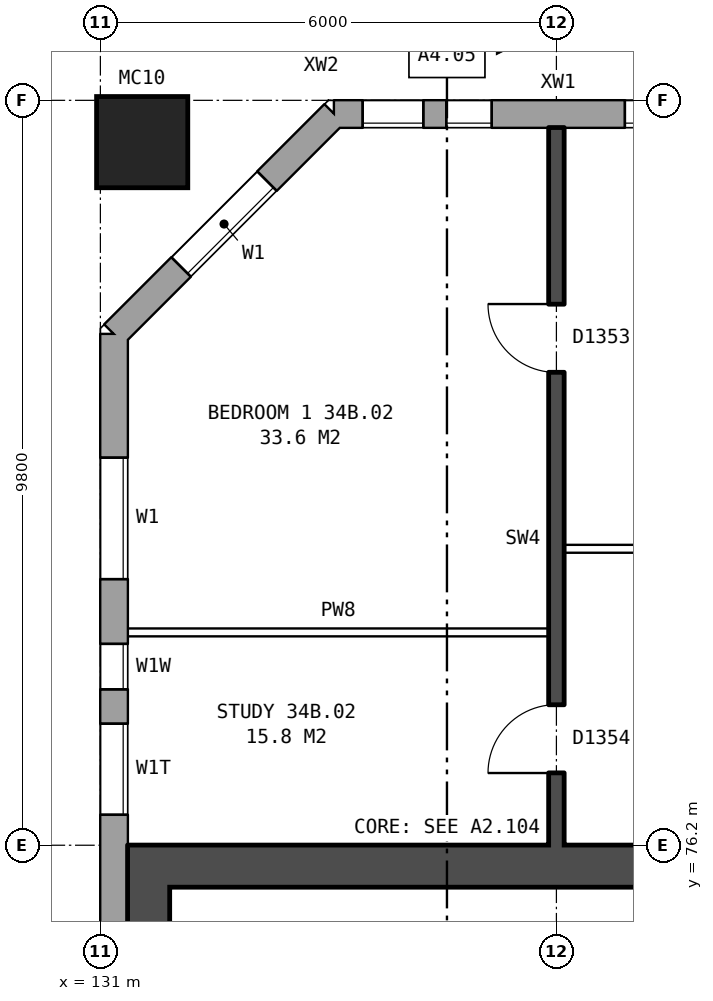
"""IFC4 building model, lengths in metres.
Left out: names, types, materials, properties, quantities, classifications, styles, units other than length and angle.
Written with IfcOpenShell. Run it as: python <this file> out.ifc"""

import sys

from ifc_helpers import new_model, si_unit, direction, frame, frame_2d, origin, origin_2d, place, context, subcontext, project, spatial, rectangle, hollow_rectangle, extrude, element, fill, save


model = new_model("IFC4")
c1 = context("Model", 3, precision=1e-05, world=origin(), true_north=direction((0.0, 1.0)))
c2 = subcontext(c1, "Body", "Model", "MODEL_VIEW")
j1 = project(units=[si_unit("LENGTHUNIT", "METRE"), si_unit("PLANEANGLEUNIT", "RADIAN")], contexts=[c1])
p1 = place(None, origin())
s1 = spatial("IfcSite", under=j1, at=p1, CompositionType="ELEMENT")
p2 = place(p1, origin())
s2 = spatial("IfcBuilding", under=s1, at=p2, CompositionType="ELEMENT")
p3 = place(p2, frame((0.0, 0.0, 123.7)))
s3 = spatial("IfcBuildingStorey", under=s2, at=p3, CompositionType="ELEMENT", Elevation=123.7)
p4 = place(p3, frame((131.55, 85.45, 0.0), z_axis=(0.0, 0.0, 1.0), x_axis=(1.0, 0.0, 0.0)))
e1 = element("IfcColumn", 1, at=p4, inside=s3, PredefinedType="COLUMN", context=c2, shape_type="SweptSolid", body=[
    extrude(hollow_rectangle(XDim=1.2, YDim=1.2, WallThickness=0.065, at=origin_2d()), origin(), (0.0, 0.0, 1.0), 3.1),
])
p5 = place(p3, frame((169.675, 85.82, 0.0), z_axis=(0.0, 0.0, 1.0), x_axis=(-1.0, 0.0, 0.0)))
e2 = element("IfcWall", 2, at=p5, inside=s3, PredefinedType="STANDARD", context=c2, shape_type="SweptSolid", body=[
    extrude(rectangle(XDim=35.601, YDim=0.36, at=frame_2d((17.8, 0.0))), origin(), (0.0, 0.0, 1.0), 2.85),
])
p6 = place(p5, frame((0.3, 0.0, 0.8)))
e3 = element("IfcOpeningElement", 3, at=p6, cuts=e2, PredefinedType="OPENING", context=c2, shape_type="SweptSolid", body=[
    extrude(rectangle(XDim=0.8, YDim=1.8, at=frame_2d((0.4, 0.9))), frame((0.0, 0.19, 0.0), z_axis=(0.0, -1.0, 0.0), x_axis=(1.0, 0.0, 0.0)), (0.0, 0.0, 1.0), 0.38),
])
p7 = place(p5, frame((3.125, 0.0, 0.8)))
e4 = element("IfcOpeningElement", 4, at=p7, cuts=e2, PredefinedType="OPENING", context=c2, shape_type="SweptSolid", body=[
    extrude(rectangle(XDim=0.8, YDim=0.9, at=frame_2d((0.4, 0.45))), frame((0.0, 0.19, 0.0), z_axis=(0.0, -1.0, 0.0), x_axis=(1.0, 0.0, 0.0)), (0.0, 0.0, 1.0), 0.38),
])
p8 = place(p5, frame((6.375, 0.0, 0.8)))
e5 = element("IfcOpeningElement", 5, at=p8, cuts=e2, PredefinedType="OPENING", context=c2, shape_type="SweptSolid", body=[
    extrude(rectangle(XDim=1.6, YDim=1.8, at=frame_2d((0.8, 0.9))), frame((0.0, 0.19, 0.0), z_axis=(0.0, -1.0, 0.0), x_axis=(1.0, 0.0, 0.0)), (0.0, 0.0, 1.0), 0.38),
])
p9 = place(p5, frame((9.375, 0.0, 0.8)))
e6 = element("IfcOpeningElement", 6, at=p9, cuts=e2, PredefinedType="OPENING", context=c2, shape_type="SweptSolid", body=[
    extrude(rectangle(XDim=1.6, YDim=1.8, at=frame_2d((0.8, 0.9))), frame((0.0, 0.19, 0.0), z_axis=(0.0, -1.0, 0.0), x_axis=(1.0, 0.0, 0.0)), (0.0, 0.0, 1.0), 0.38),
])
p10 = place(p5, frame((12.375, 0.0, 0.8)))
e7 = element("IfcOpeningElement", 7, at=p10, cuts=e2, PredefinedType="OPENING", context=c2, shape_type="SweptSolid", body=[
    extrude(rectangle(XDim=1.6, YDim=1.8, at=frame_2d((0.8, 0.9))), frame((0.0, 0.19, 0.0), z_axis=(0.0, -1.0, 0.0), x_axis=(1.0, 0.0, 0.0)), (0.0, 0.0, 1.0), 0.38),
])
p11 = place(p5, frame((15.375, 0.0, 0.8)))
e8 = element("IfcOpeningElement", 8, at=p11, cuts=e2, PredefinedType="OPENING", context=c2, shape_type="SweptSolid", body=[
    extrude(rectangle(XDim=1.6, YDim=1.8, at=frame_2d((0.8, 0.9))), frame((0.0, 0.19, 0.0), z_axis=(0.0, -1.0, 0.0), x_axis=(1.0, 0.0, 0.0)), (0.0, 0.0, 1.0), 0.38),
])
p12 = place(p5, frame((18.375, 0.0, 0.8)))
e9 = element("IfcOpeningElement", 9, at=p12, cuts=e2, PredefinedType="OPENING", context=c2, shape_type="SweptSolid", body=[
    extrude(rectangle(XDim=1.6, YDim=1.8, at=frame_2d((0.8, 0.9))), frame((0.0, 0.19, 0.0), z_axis=(0.0, -1.0, 0.0), x_axis=(1.0, 0.0, 0.0)), (0.0, 0.0, 1.0), 0.38),
])
p13 = place(p5, frame((21.375, 0.0, 0.8)))
e10 = element("IfcOpeningElement", 10, at=p13, cuts=e2, PredefinedType="OPENING", context=c2, shape_type="SweptSolid", body=[
    extrude(rectangle(XDim=1.6, YDim=1.8, at=frame_2d((0.8, 0.9))), frame((0.0, 0.19, 0.0), z_axis=(0.0, -1.0, 0.0), x_axis=(1.0, 0.0, 0.0)), (0.0, 0.0, 1.0), 0.38),
])
p14 = place(p5, frame((24.375, 0.0, 0.8)))
e11 = element("IfcOpeningElement", 11, at=p14, cuts=e2, PredefinedType="OPENING", context=c2, shape_type="SweptSolid", body=[
    extrude(rectangle(XDim=1.6, YDim=1.8, at=frame_2d((0.8, 0.9))), frame((0.0, 0.19, 0.0), z_axis=(0.0, -1.0, 0.0), x_axis=(1.0, 0.0, 0.0)), (0.0, 0.0, 1.0), 0.38),
])
p15 = place(p5, frame((27.375, 0.0, 0.8)))
e12 = element("IfcOpeningElement", 12, at=p15, cuts=e2, PredefinedType="OPENING", context=c2, shape_type="SweptSolid", body=[
    extrude(rectangle(XDim=1.6, YDim=1.8, at=frame_2d((0.8, 0.9))), frame((0.0, 0.19, 0.0), z_axis=(0.0, -1.0, 0.0), x_axis=(1.0, 0.0, 0.0)), (0.0, 0.0, 1.0), 0.38),
])
p16 = place(p5, frame((29.275, 0.0, 0.8)))
e13 = element("IfcOpeningElement", 13, at=p16, cuts=e2, PredefinedType="OPENING", context=c2, shape_type="SweptSolid", body=[
    extrude(rectangle(XDim=1.4, YDim=1.8, at=frame_2d((0.7, 0.9))), frame((0.0, 0.19, 0.0), z_axis=(0.0, -1.0, 0.0), x_axis=(1.0, 0.0, 0.0)), (0.0, 0.0, 1.0), 0.38),
])
p17 = place(p5, frame((33.525, 0.0, 1.7)))
e14 = element("IfcOpeningElement", 14, at=p17, cuts=e2, PredefinedType="OPENING", context=c2, shape_type="SweptSolid", body=[
    extrude(rectangle(XDim=0.6, YDim=0.9, at=frame_2d((0.3, 0.45))), frame((0.0, 0.19, 0.0), z_axis=(0.0, -1.0, 0.0), x_axis=(1.0, 0.0, 0.0)), (0.0, 0.0, 1.0), 0.38),
])
p18 = place(p5, frame((1.4, 0.0, 1.6)))
e15 = element("IfcOpeningElement", 15, at=p18, cuts=e2, PredefinedType="OPENING", context=c2, shape_type="SweptSolid", body=[
    extrude(rectangle(XDim=0.6, YDim=0.9, at=frame_2d((0.3, 0.45))), frame((0.0, 0.19, 0.0), z_axis=(0.0, -1.0, 0.0), x_axis=(1.0, 0.0, 0.0)), (0.0, 0.0, 1.0), 0.38),
])
p19 = place(p5, frame((4.225, 0.0, 0.8)))
e16 = element("IfcOpeningElement", 16, at=p19, cuts=e2, PredefinedType="OPENING", context=c2, shape_type="SweptSolid", body=[
    extrude(rectangle(XDim=1.6, YDim=1.8, at=frame_2d((0.8, 0.9))), frame((0.0, 0.19, 0.0), z_axis=(0.0, -1.0, 0.0), x_axis=(1.0, 0.0, 0.0)), (0.0, 0.0, 1.0), 0.38),
])
p20 = place(p5, frame((30.975, 0.0, 0.8)))
e17 = element("IfcOpeningElement", 17, at=p20, cuts=e2, PredefinedType="OPENING", context=c2, shape_type="SweptSolid", body=[
    extrude(rectangle(XDim=0.8, YDim=1.5, at=frame_2d((0.4, 0.75))), frame((0.0, 0.19, 0.0), z_axis=(0.0, -1.0, 0.0), x_axis=(1.0, 0.0, 0.0)), (0.0, 0.0, 1.0), 0.38),
])
p21 = place(p5, frame((34.425, 0.0, 0.8)))
e18 = element("IfcOpeningElement", 18, at=p21, cuts=e2, PredefinedType="OPENING", context=c2, shape_type="SweptSolid", body=[
    extrude(rectangle(XDim=0.8, YDim=1.8, at=frame_2d((0.4, 0.9))), frame((0.0, 0.19, 0.0), z_axis=(0.0, -1.0, 0.0), x_axis=(1.0, 0.0, 0.0)), (0.0, 0.0, 1.0), 0.38),
])
p22 = place(p3, frame((134.075, 85.82, 0.0), z_axis=(0.0, 0.0, 1.0), x_axis=(-0.707106781187, -0.707106781187, 0.0)))
e19 = element("IfcWall", 19, at=p22, inside=s3, PredefinedType="STANDARD", context=c2, shape_type="SweptSolid", body=[
    extrude(rectangle(XDim=4.094, YDim=0.36, at=frame_2d((2.047, 0.0))), origin(), (0.0, 0.0, 1.0), 2.85),
])
p23 = place(p22, frame((1.247, 0.0, 0.8)))
e20 = element("IfcOpeningElement", 20, at=p23, cuts=e19, PredefinedType="OPENING", context=c2, shape_type="SweptSolid", body=[
    extrude(rectangle(XDim=1.6, YDim=1.8, at=frame_2d((0.8, 0.9))), frame((0.0, 0.19, 0.0), z_axis=(0.0, -1.0, 0.0), x_axis=(1.0, 0.0, 0.0)), (0.0, 0.0, 1.0), 0.38),
])
p24 = place(p3, frame((131.18, 82.925, 0.0), z_axis=(0.0, 0.0, 1.0), x_axis=(0.0, -1.0, 0.0)))
e21 = element("IfcWall", 21, at=p24, inside=s3, PredefinedType="STANDARD", context=c2, shape_type="SweptSolid", body=[
    extrude(rectangle(XDim=25.851, YDim=0.36, at=frame_2d((12.925, 0.0))), origin(), (0.0, 0.0, 1.0), 2.85),
])
p25 = place(p24, frame((1.625, 0.0, 0.8)))
e22 = element("IfcOpeningElement", 22, at=p25, cuts=e21, PredefinedType="OPENING", context=c2, shape_type="SweptSolid", body=[
    extrude(rectangle(XDim=1.6, YDim=1.8, at=frame_2d((0.8, 0.9))), frame((0.0, 0.19, 0.0), z_axis=(0.0, -1.0, 0.0), x_axis=(1.0, 0.0, 0.0)), (0.0, 0.0, 1.0), 0.38),
])
p26 = place(p24, frame((4.075, 0.0, 1.65)))
e23 = element("IfcOpeningElement", 23, at=p26, cuts=e21, PredefinedType="OPENING", context=c2, shape_type="SweptSolid", body=[
    extrude(rectangle(XDim=0.6, YDim=0.9, at=frame_2d((0.3, 0.45))), frame((0.0, 0.19, 0.0), z_axis=(0.0, -1.0, 0.0), x_axis=(1.0, 0.0, 0.0)), (0.0, 0.0, 1.0), 0.38),
])
p27 = place(p24, frame((19.5, 0.0, 0.35)))
e24 = element("IfcOpeningElement", 24, at=p27, cuts=e21, PredefinedType="OPENING", context=c2, shape_type="SweptSolid", body=[
    extrude(rectangle(XDim=1.2, YDim=0.9, at=frame_2d((0.6, 0.45))), frame((0.0, 0.19, 0.0), z_axis=(0.0, -1.0, 0.0), x_axis=(1.0, 0.0, 0.0)), (0.0, 0.0, 1.0), 0.38),
])
p28 = place(p24, frame((22.625, 0.0, 0.8)))
e25 = element("IfcOpeningElement", 25, at=p28, cuts=e21, PredefinedType="OPENING", context=c2, shape_type="SweptSolid", body=[
    extrude(rectangle(XDim=1.6, YDim=1.8, at=frame_2d((0.8, 0.9))), frame((0.0, 0.19, 0.0), z_axis=(0.0, -1.0, 0.0), x_axis=(1.0, 0.0, 0.0)), (0.0, 0.0, 1.0), 0.38),
])
p29 = place(p24, frame((5.125, 0.0, 0.35)))
e26 = element("IfcOpeningElement", 26, at=p29, cuts=e21, PredefinedType="OPENING", context=c2, shape_type="SweptSolid", body=[
    extrude(rectangle(XDim=1.2, YDim=0.9, at=frame_2d((0.6, 0.45))), frame((0.0, 0.19, 0.0), z_axis=(0.0, -1.0, 0.0), x_axis=(1.0, 0.0, 0.0)), (0.0, 0.0, 1.0), 0.38),
])
p30 = place(p24, frame((21.1, 0.0, 1.65)))
e27 = element("IfcOpeningElement", 27, at=p30, cuts=e21, PredefinedType="OPENING", context=c2, shape_type="SweptSolid", body=[
    extrude(rectangle(XDim=0.6, YDim=0.9, at=frame_2d((0.3, 0.45))), frame((0.0, 0.19, 0.0), z_axis=(0.0, -1.0, 0.0), x_axis=(1.0, 0.0, 0.0)), (0.0, 0.0, 1.0), 0.38),
])
p31 = place(p3, frame((131.635, 63.8, 0.0), z_axis=(0.0, 0.0, 1.0), x_axis=(0.0, 1.0, 0.0)))
e28 = element("IfcWall", 28, at=p31, inside=s3, PredefinedType="SHEAR", context=c2, shape_type="SweptSolid", body=[
    extrude(rectangle(XDim=12.4, YDim=0.55, at=frame_2d((6.2, 0.0))), origin(), (0.0, 0.0, 1.0), 2.85),
])
p32 = place(p3, frame((139.21, 75.925, 0.0), z_axis=(0.0, 0.0, 1.0), x_axis=(-1.0, 0.0, 0.0)))
e29 = element("IfcWall", 29, at=p32, inside=s3, PredefinedType="SHEAR", context=c2, shape_type="SweptSolid", body=[
    extrude(rectangle(XDim=7.3, YDim=0.55, at=frame_2d((3.65, 0.0))), origin(), (0.0, 0.0, 1.0), 2.85),
])
p33 = place(p3, frame((131.36, 79.0, 0.0), z_axis=(0.0, 0.0, 1.0), x_axis=(1.0, 0.0, 0.0)))
e30 = element("IfcWall", 30, at=p33, inside=s3, PredefinedType="PARTITIONING", context=c2, shape_type="SweptSolid", body=[
    extrude(rectangle(XDim=5.54, YDim=0.1, at=frame_2d((2.77, 0.0))), origin(), (0.0, 0.0, 1.0), 2.85),
])
p34 = place(p3, frame((137.1, 80.1, 0.0), z_axis=(0.0, 0.0, 1.0), x_axis=(1.0, 0.0, 0.0)))
e31 = element("IfcWall", 31, at=p34, inside=s3, PredefinedType="PARTITIONING", context=c2, shape_type="SweptSolid", body=[
    extrude(rectangle(XDim=5.8, YDim=0.1, at=frame_2d((2.9, 0.0))), origin(), (0.0, 0.0, 1.0), 2.85),
])
p35 = place(p34, frame((1.3, 0.0, 0.0)))
e32 = element("IfcOpeningElement", 32, at=p35, cuts=e31, PredefinedType="OPENING", context=c2, shape_type="SweptSolid", body=[
    extrude(rectangle(XDim=0.9, YDim=2.1, at=frame_2d((0.45, 1.05))), frame((0.0, 0.06, 0.0), z_axis=(0.0, -1.0, 0.0), x_axis=(1.0, 0.0, 0.0)), (0.0, 0.0, 1.0), 0.12),
])
p36 = place(p34, frame((4.2, 0.0, 0.0)))
e33 = element("IfcOpeningElement", 33, at=p36, cuts=e31, PredefinedType="OPENING", context=c2, shape_type="SweptSolid", body=[
    extrude(rectangle(XDim=0.9, YDim=2.1, at=frame_2d((0.45, 1.05))), frame((0.0, 0.06, 0.0), z_axis=(0.0, -1.0, 0.0), x_axis=(1.0, 0.0, 0.0)), (0.0, 0.0, 1.0), 0.12),
])
p37 = place(p3, frame((137.0, 76.2, 0.0), z_axis=(0.0, 0.0, 1.0), x_axis=(0.0, 1.0, 0.0)))
e34 = element("IfcWall", 34, at=p37, inside=s3, PredefinedType="SOLIDWALL", context=c2, shape_type="SweptSolid", body=[
    extrude(rectangle(XDim=9.44, YDim=0.2, at=frame_2d((4.72, 0.0))), origin(), (0.0, 0.0, 1.0), 2.85),
])
p38 = place(p37, frame((6.22, 0.0, 0.0)))
e35 = element("IfcOpeningElement", 35, at=p38, cuts=e34, PredefinedType="OPENING", context=c2, shape_type="SweptSolid", body=[
    extrude(rectangle(XDim=0.9, YDim=2.1, at=frame_2d((0.45, 1.05))), frame((0.0, 0.11, 0.0), z_axis=(0.0, -1.0, 0.0), x_axis=(1.0, 0.0, 0.0)), (0.0, 0.0, 1.0), 0.22),
])
p39 = place(p37, frame((0.95, 0.0, 0.0)))
e36 = element("IfcOpeningElement", 36, at=p39, cuts=e34, PredefinedType="OPENING", context=c2, shape_type="SweptSolid", body=[
    extrude(rectangle(XDim=0.9, YDim=2.1, at=frame_2d((0.45, 1.05))), frame((0.0, 0.11, 0.0), z_axis=(0.0, -1.0, 0.0), x_axis=(1.0, 0.0, 0.0)), (0.0, 0.0, 1.0), 0.22),
])
p40 = place(p17, origin())
e37 = element("IfcWindow", 37, at=p40, inside=s3, PartitioningType="SINGLE_PANEL", PredefinedType="WINDOW", context=c2, shape_type="SweptSolid", body=[
    extrude(rectangle(XDim=0.6, YDim=0.9, at=frame_2d((0.3, 0.45))), frame((0.0, 0.15, 0.0), z_axis=(0.0, -1.0, 0.0), x_axis=(1.0, 0.0, 0.0)), (0.0, 0.0, 1.0), 0.06),
])
fill(e14, e37)
p41 = place(p23, origin())
e38 = element("IfcWindow", 38, at=p41, inside=s3, PartitioningType="SINGLE_PANEL", PredefinedType="WINDOW", context=c2, shape_type="SweptSolid", body=[
    extrude(rectangle(XDim=1.6, YDim=1.8, at=frame_2d((0.8, 0.9))), frame((0.0, 0.15, 0.0), z_axis=(0.0, -1.0, 0.0), x_axis=(1.0, 0.0, 0.0)), (0.0, 0.0, 1.0), 0.06),
])
fill(e20, e38)
p42 = place(p25, origin())
e39 = element("IfcWindow", 39, at=p42, inside=s3, PartitioningType="SINGLE_PANEL", PredefinedType="WINDOW", context=c2, shape_type="SweptSolid", body=[
    extrude(rectangle(XDim=1.6, YDim=1.8, at=frame_2d((0.8, 0.9))), frame((0.0, 0.15, 0.0), z_axis=(0.0, -1.0, 0.0), x_axis=(1.0, 0.0, 0.0)), (0.0, 0.0, 1.0), 0.06),
])
fill(e22, e39)
p43 = place(p26, origin())
e40 = element("IfcWindow", 40, at=p43, inside=s3, PartitioningType="SINGLE_PANEL", PredefinedType="WINDOW", context=c2, shape_type="SweptSolid", body=[
    extrude(rectangle(XDim=0.6, YDim=0.9, at=frame_2d((0.3, 0.45))), frame((0.0, 0.15, 0.0), z_axis=(0.0, -1.0, 0.0), x_axis=(1.0, 0.0, 0.0)), (0.0, 0.0, 1.0), 0.06),
])
fill(e23, e40)
p44 = place(p38, origin())
e41 = element("IfcDoor", 41, at=p44, inside=s3, OperationType="SINGLE_SWING_RIGHT", PredefinedType="DOOR", context=c2, shape_type="SweptSolid", body=[
    extrude(rectangle(XDim=0.9, YDim=2.1, at=frame_2d((0.45, 1.05))), frame((0.0, 0.025, 0.0), z_axis=(0.0, -1.0, 0.0), x_axis=(1.0, 0.0, 0.0)), (0.0, 0.0, 1.0), 0.05),
])
fill(e35, e41)
p45 = place(p39, origin())
e42 = element("IfcDoor", 42, at=p45, inside=s3, OperationType="SINGLE_SWING_LEFT", PredefinedType="DOOR", context=c2, shape_type="SweptSolid", body=[
    extrude(rectangle(XDim=0.9, YDim=2.1, at=frame_2d((0.45, 1.05))), frame((0.0, 0.025, 0.0), z_axis=(0.0, -1.0, 0.0), x_axis=(1.0, 0.0, 0.0)), (0.0, 0.0, 1.0), 0.05),
])
fill(e36, e42)
p46 = place(p20, origin())
e43 = element("IfcWindow", 43, at=p46, inside=s3, PartitioningType="SINGLE_PANEL", PredefinedType="WINDOW", context=c2, shape_type="SweptSolid", body=[
    extrude(rectangle(XDim=0.8, YDim=1.5, at=frame_2d((0.4, 0.75))), frame((0.0, 0.15, 0.0), z_axis=(0.0, -1.0, 0.0), x_axis=(1.0, 0.0, 0.0)), (0.0, 0.0, 1.0), 0.06),
])
fill(e17, e43)
p47 = place(p21, origin())
e44 = element("IfcWindow", 44, at=p47, inside=s3, PartitioningType="SINGLE_PANEL", PredefinedType="WINDOW", context=c2, shape_type="SweptSolid", body=[
    extrude(rectangle(XDim=0.8, YDim=1.8, at=frame_2d((0.4, 0.9))), frame((0.0, 0.15, 0.0), z_axis=(0.0, -1.0, 0.0), x_axis=(1.0, 0.0, 0.0)), (0.0, 0.0, 1.0), 0.06),
])
fill(e18, e44)
p48 = place(p29, origin())
e45 = element("IfcWindow", 45, at=p48, inside=s3, PartitioningType="SINGLE_PANEL", PredefinedType="WINDOW", context=c2, shape_type="SweptSolid", body=[
    extrude(rectangle(XDim=1.2, YDim=0.9, at=frame_2d((0.6, 0.45))), frame((0.0, 0.15, 0.0), z_axis=(0.0, -1.0, 0.0), x_axis=(1.0, 0.0, 0.0)), (0.0, 0.0, 1.0), 0.06),
])
fill(e26, e45)
save(model, sys.argv[1])
